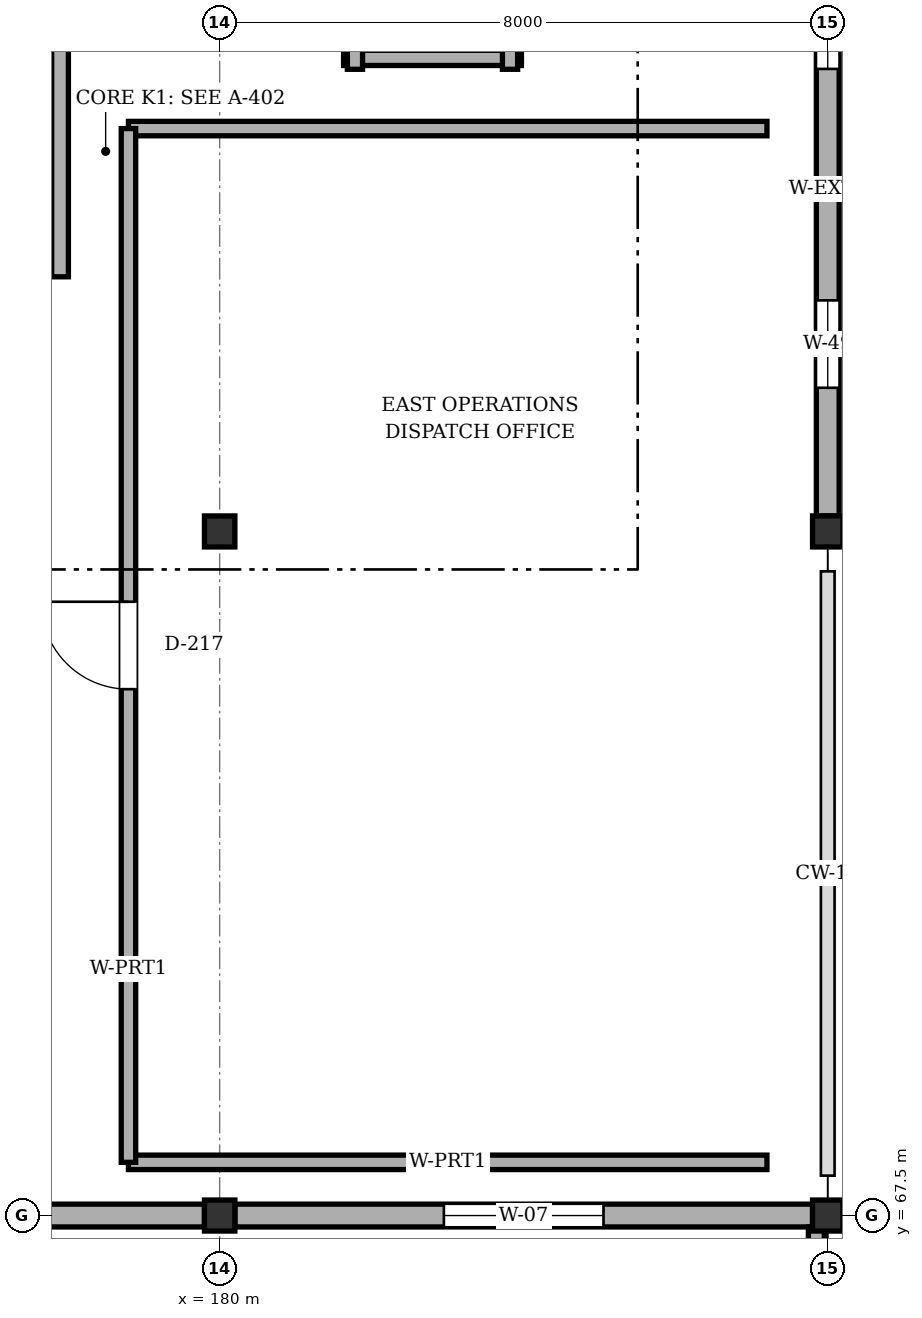
"""IFC4 building model, lengths in metres.
Left out: names, types, materials, properties, quantities, classifications, styles, units other than length and angle.
Written with IfcOpenShell. Run it as: python <this file> out.ifc"""

import sys

from ifc_helpers import new_model, si_unit, direction, frame, frame_2d, origin, origin_2d, place, context, subcontext, project, spatial, rectangle, i_section, extrude, element, fill, save


model = new_model("IFC4")
c1 = context("Model", 3, precision=1e-05, world=origin(), true_north=direction((0.0, 1.0)))
c2 = subcontext(c1, "Body", "Model", "MODEL_VIEW")
j1 = project(units=[si_unit("LENGTHUNIT", "METRE"), si_unit("PLANEANGLEUNIT", "RADIAN")], contexts=[c1])
p1 = place(None, origin())
s1 = spatial("IfcSite", under=j1, at=p1, CompositionType="ELEMENT")
p2 = place(p1, origin())
s2 = spatial("IfcBuilding", under=s1, at=p2, CompositionType="ELEMENT")
p3 = place(p2, frame((0.0, 0.0, 10.8)))
s3 = spatial("IfcBuildingStorey", under=s2, at=p3, CompositionType="ELEMENT", Elevation=10.8)
for number, where, z_axis, x_axis in (
    (1, (180.0, 67.5, 0.0), (0.0, 0.0, 1.0), (1.0, 0.0, 0.0)),
    (2, (180.0, 76.5, 0.0), (0.0, 0.0, 1.0), (1.0, 0.0, 0.0)),
    (3, (188.0, 67.5, 0.0), (0.0, 0.0, 1.0), (1.0, 0.0, 0.0)),
    (4, (188.0, 76.5, 0.0), (0.0, 0.0, 1.0), (1.0, 0.0, 0.0)),
):
    element("IfcColumn", number, at=place(p3, frame(where, z_axis=z_axis, x_axis=x_axis)), inside=s3, PredefinedType="COLUMN", context=c2, shape_type="SweptSolid", body=[
        extrude(i_section(OverallWidth=0.4, OverallDepth=0.408, WebThickness=0.021, FlangeThickness=0.021, FilletRadius=0.022, at=origin_2d()), origin(), (0.0, 0.0, 1.0), 3.6),
    ])
p4 = place(p3, frame((187.8, 67.5, 0.0), z_axis=(0.0, 0.0, 1.0), x_axis=(-1.0, 0.0, 0.0)))
e5 = element("IfcWall", 5, at=p4, inside=s3, PredefinedType="SOLIDWALL", context=c2, shape_type="SweptSolid", body=[
    extrude(rectangle(XDim=7.6, YDim=0.3, at=frame_2d((3.8, 0.0))), origin(), (0.0, 0.0, 1.0), 2.895),
])
p5 = place(p4, frame((2.75, 0.0, 0.9)))
e6 = element("IfcOpeningElement", 6, at=p5, cuts=e5, PredefinedType="OPENING", context=c2, shape_type="SweptSolid", body=[
    extrude(rectangle(XDim=2.1, YDim=1.6, at=frame_2d((1.05, 0.8))), frame((0.0, 0.16, 0.0), z_axis=(0.0, -1.0, 0.0), x_axis=(1.0, 0.0, 0.0)), (0.0, 0.0, 1.0), 0.32),
])
p6 = place(p3, frame((179.8, 67.5, 0.0), z_axis=(0.0, 0.0, 1.0), x_axis=(-1.0, 0.0, 0.0)))
e7 = element("IfcWall", 7, at=p6, inside=s3, PredefinedType="SOLIDWALL", context=c2, shape_type="SweptSolid", body=[
    extrude(rectangle(XDim=7.6, YDim=0.3, at=frame_2d((3.8, 0.0))), origin(), (0.0, 0.0, 1.0), 2.915),
])
p7 = place(p6, frame((2.9, 0.0, 0.9)))
e8 = element("IfcOpeningElement", 8, at=p7, cuts=e7, PredefinedType="OPENING", context=c2, shape_type="SweptSolid", body=[
    extrude(rectangle(XDim=1.8, YDim=1.6, at=frame_2d((0.9, 0.8))), frame((0.0, 0.16, 0.0), z_axis=(0.0, -1.0, 0.0), x_axis=(1.0, 0.0, 0.0)), (0.0, 0.0, 1.0), 0.32),
])
p8 = place(p3, frame((188.0, 85.296, 0.0), z_axis=(0.0, 0.0, 1.0), x_axis=(0.0, -1.0, 0.0)))
e9 = element("IfcWall", 9, at=p8, inside=s3, PredefinedType="SOLIDWALL", context=c2, shape_type="SweptSolid", body=[
    extrude(rectangle(XDim=8.592, YDim=0.3, at=frame_2d((4.296, 0.0))), origin(), (0.0, 0.0, 1.0), 2.895),
])
p9 = place(p8, frame((1.811, 0.0, 0.9)))
e10 = element("IfcOpeningElement", 10, at=p9, cuts=e9, PredefinedType="OPENING", context=c2, shape_type="SweptSolid", body=[
    extrude(rectangle(XDim=0.9, YDim=1.4, at=frame_2d((0.45, 0.7))), frame((0.0, 0.16, 0.0), z_axis=(0.0, -1.0, 0.0), x_axis=(1.0, 0.0, 0.0)), (0.0, 0.0, 1.0), 0.32),
])
p10 = place(p8, frame((5.756, 0.0, 0.9)))
e11 = element("IfcOpeningElement", 11, at=p10, cuts=e9, PredefinedType="OPENING", context=c2, shape_type="SweptSolid", body=[
    extrude(rectangle(XDim=1.15, YDim=1.45, at=frame_2d((0.575, 0.725))), frame((0.0, 0.16, 0.0), z_axis=(0.0, -1.0, 0.0), x_axis=(1.0, 0.0, 0.0)), (0.0, 0.0, 1.0), 0.32),
])
p11 = place(p3, frame((187.85, 54.15, 0.0), z_axis=(0.0, 0.0, 1.0), x_axis=(0.0, 1.0, 0.0)))
e12 = element("IfcWall", 12, at=p11, inside=s3, PredefinedType="PARAPET", context=c2, shape_type="SweptSolid", body=[
    extrude(rectangle(XDim=13.2, YDim=0.21, at=frame_2d((6.6, 0.0))), origin(), (0.0, 0.0, 1.0), 1.2),
])
p12 = place(p3, frame((181.63, 82.73, 0.0), z_axis=(0.0, 0.0, 1.0), x_axis=(1.0, 0.0, 0.0)))
e13 = element("IfcWall", 13, at=p12, inside=s3, PredefinedType="SOLIDWALL", context=c2, shape_type="SweptSolid", body=[
    extrude(rectangle(XDim=2.34, YDim=0.2, at=frame_2d((1.17, 0.0))), origin(), (0.0, 0.0, 1.0), 3.355),
])
for number, where, z_axis, x_axis in (
    (14, (181.78, 85.42, 0.0), (0.0, 0.0, 1.0), (0.0, -1.0, 0.0)),
    (15, (183.82, 82.58, 0.0), (0.0, 0.0, 1.0), (0.0, 1.0, 0.0)),
):
    element("IfcWall", number, at=place(p3, frame(where, z_axis=z_axis, x_axis=x_axis)), inside=s3, PredefinedType="SOLIDWALL", context=c2, shape_type="SweptSolid", body=[
        extrude(rectangle(XDim=2.84, YDim=0.2, at=frame_2d((1.42, 0.0))), origin(), (0.0, 0.0, 1.0), 2.915),
    ])
for number, where, z_axis, x_axis in (
    (16, (187.2, 68.2, 0.0), (0.0, 0.0, 1.0), (-1.0, 0.0, 0.0)),
    (17, (178.8, 81.8, 0.0), (0.0, 0.0, 1.0), (1.0, 0.0, 0.0)),
):
    element("IfcWall", number, at=place(p3, frame(where, z_axis=z_axis, x_axis=x_axis)), inside=s3, PredefinedType="PARTITIONING", context=c2, shape_type="SweptSolid", body=[
        extrude(rectangle(XDim=8.4, YDim=0.19, at=frame_2d((4.2, 0.0))), origin(), (0.0, 0.0, 1.0), 2.895),
    ])
p13 = place(p3, frame((178.8, 68.2, 0.0), z_axis=(0.0, 0.0, 1.0), x_axis=(0.0, 1.0, 0.0)))
e18 = element("IfcWall", 18, at=p13, inside=s3, PredefinedType="PARTITIONING", context=c2, shape_type="SweptSolid", body=[
    extrude(rectangle(XDim=13.6, YDim=0.19, at=frame_2d((6.8, 0.0))), origin(), (0.0, 0.0, 1.0), 2.915),
])
p14 = place(p13, frame((6.225, 0.0, 0.0)))
e19 = element("IfcOpeningElement", 19, at=p14, cuts=e18, PredefinedType="OPENING", context=c2, shape_type="SweptSolid", body=[
    extrude(rectangle(XDim=1.15, YDim=2.1, at=frame_2d((0.575, 1.05))), frame((0.0, 0.105, 0.0), z_axis=(0.0, -1.0, 0.0), x_axis=(1.0, 0.0, 0.0)), (0.0, 0.0, 1.0), 0.21),
])
p15 = place(p3, frame((177.9, 84.05, 0.0), z_axis=(0.0, 0.0, 1.0), x_axis=(0.0, -1.0, 0.0)))
e20 = element("IfcWall", 20, at=p15, inside=s3, PredefinedType="SOLIDWALL", context=c2, shape_type="SweptSolid", body=[
    extrude(rectangle(XDim=4.2, YDim=0.22, at=frame_2d((2.1, 0.0))), origin(), (0.0, 0.0, 1.0), 3.355),
])
p16 = place(p5, origin())
e21 = element("IfcWindow", 21, at=p16, inside=s3, PartitioningType="SINGLE_PANEL", PredefinedType="WINDOW", context=c2, shape_type="SweptSolid", body=[
    extrude(rectangle(XDim=2.1, YDim=1.6, at=frame_2d((1.05, 0.8))), frame((0.0, 0.03, 0.0), z_axis=(0.0, -1.0, 0.0), x_axis=(1.0, 0.0, 0.0)), (0.0, 0.0, 1.0), 0.06),
])
fill(e6, e21)
p17 = place(p9, origin())
e22 = element("IfcWindow", 22, at=p17, inside=s3, PartitioningType="SINGLE_PANEL", PredefinedType="WINDOW", context=c2, shape_type="SweptSolid", body=[
    extrude(rectangle(XDim=0.9, YDim=1.4, at=frame_2d((0.45, 0.7))), frame((0.0, 0.03, 0.0), z_axis=(0.0, -1.0, 0.0), x_axis=(1.0, 0.0, 0.0)), (0.0, 0.0, 1.0), 0.06),
])
fill(e10, e22)
p18 = place(p10, origin())
e23 = element("IfcWindow", 23, at=p18, inside=s3, PartitioningType="SINGLE_PANEL", PredefinedType="WINDOW", context=c2, shape_type="SweptSolid", body=[
    extrude(rectangle(XDim=1.15, YDim=1.45, at=frame_2d((0.575, 0.725))), frame((0.0, 0.03, 0.0), z_axis=(0.0, -1.0, 0.0), x_axis=(1.0, 0.0, 0.0)), (0.0, 0.0, 1.0), 0.06),
])
fill(e11, e23)
p19 = place(p14, origin())
e24 = element("IfcDoor", 24, at=p19, inside=s3, OperationType="SINGLE_SWING_RIGHT", PredefinedType="DOOR", context=c2, shape_type="SweptSolid", body=[
    extrude(rectangle(XDim=1.15, YDim=2.1, at=frame_2d((0.575, 1.05))), frame((0.0, 0.025, 0.0), z_axis=(0.0, -1.0, 0.0), x_axis=(1.0, 0.0, 0.0)), (0.0, 0.0, 1.0), 0.05),
])
fill(e19, e24)
save(model, sys.argv[1])
